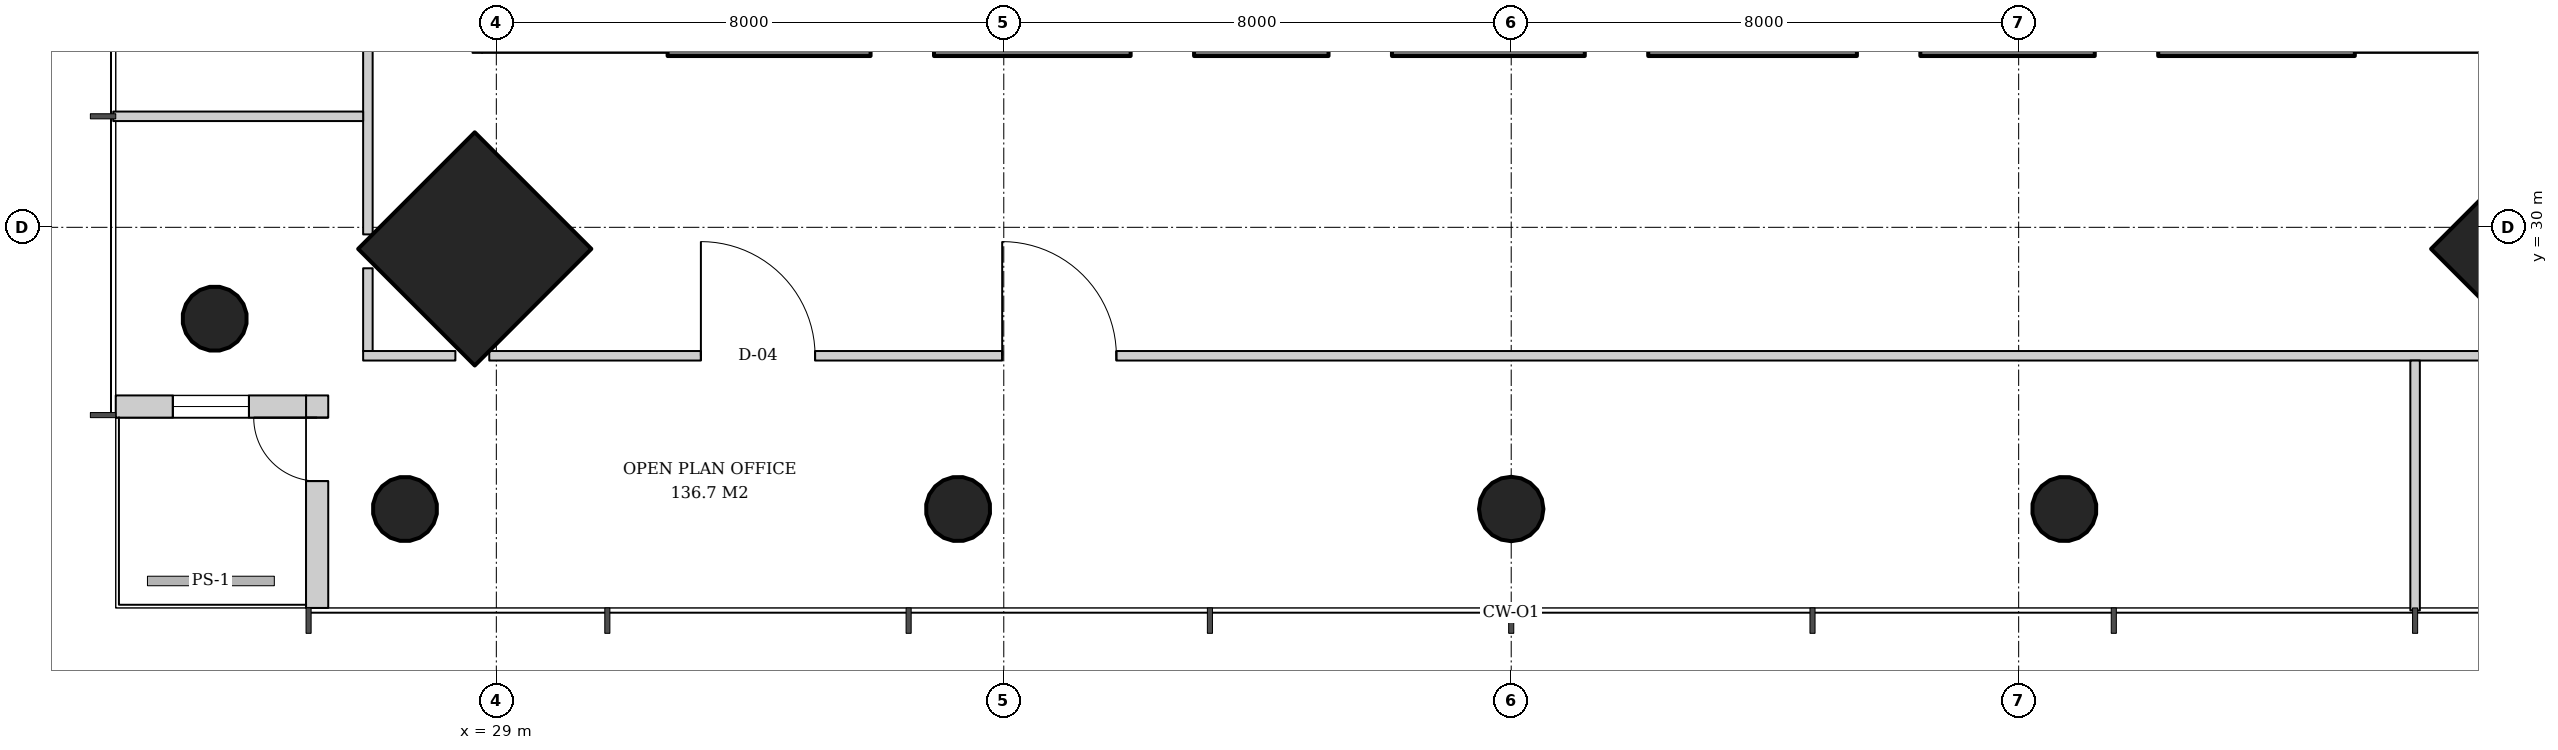
"""IFC4 building model, lengths in metres.
Left out: names, types, materials, properties, quantities, classifications, styles, units other than length and angle.
Written with IfcOpenShell. Run it as: python <this file> out.ifc"""

import sys

from ifc_helpers import new_model, si_unit, direction, frame, frame_2d, origin, origin_2d, place, context, subcontext, project, spatial, rectangle, hollow_circle, extrude, element, fill, save


model = new_model("IFC4")
c1 = context("Model", 3, precision=1e-05, world=origin(), true_north=direction((0.0, 1.0)))
c2 = subcontext(c1, "Body", "Model", "MODEL_VIEW")
j1 = project(units=[si_unit("LENGTHUNIT", "METRE"), si_unit("PLANEANGLEUNIT", "RADIAN")], contexts=[c1])
p1 = place(None, origin())
s1 = spatial("IfcSite", under=j1, at=p1, CompositionType="ELEMENT")
p2 = place(p1, origin())
s2 = spatial("IfcBuilding", under=s1, at=p2, CompositionType="ELEMENT")
p3 = place(p2, frame((0.0, 0.0, 131.2)))
s3 = spatial("IfcBuildingStorey", under=s2, at=p3, CompositionType="ELEMENT", Elevation=131.2)
p4 = place(p3, frame((28.621, 29.621, 0.0), z_axis=(0.031962158256, 0.031962158256, 0.998977898093), x_axis=(-0.707106781187, 0.707106781187, 0.0)))
e1 = element("IfcColumn", 1, at=p4, inside=s3, PredefinedType="COLUMN", context=c2, shape_type="SweptSolid", body=[
    extrude(rectangle(XDim=2.6, YDim=2.6, at=origin_2d()), origin(), (0.0, 0.0, 1.0), 3.804),
])
p5 = place(p3, frame((24.521, 28.521, 0.0), z_axis=(0.031898107953, 0.031898107953, 0.998981992539), x_axis=(-0.707106781187, 0.707106781187, 0.0)))
e2 = element("IfcColumn", 2, at=p5, inside=s3, PredefinedType="COLUMN", context=c2, shape_type="SweptSolid", body=[
    extrude(hollow_circle(Radius=0.508, WallThickness=0.04, at=origin_2d()), origin(), (0.0, 0.0, 1.0), 3.804),
])
p6 = place(p3, frame((61.379, 29.621, 0.0), z_axis=(-0.031962158256, 0.031962158256, 0.998977898093), x_axis=(-0.707106781187, -0.707106781187, 0.0)))
e3 = element("IfcColumn", 3, at=p6, inside=s3, PredefinedType="COLUMN", context=c2, shape_type="SweptSolid", body=[
    extrude(rectangle(XDim=2.6, YDim=2.6, at=origin_2d()), origin(), (0.0, 0.0, 1.0), 3.804),
])
p7 = place(p3, frame((27.521, 25.521, 0.0), z_axis=(0.031898107953, 0.031898107953, 0.998981992539), x_axis=(-0.707106781187, 0.707106781187, 0.0)))
e4 = element("IfcColumn", 4, at=p7, inside=s3, PredefinedType="COLUMN", context=c2, shape_type="SweptSolid", body=[
    extrude(hollow_circle(Radius=0.508, WallThickness=0.04, at=origin_2d()), origin(), (0.0, 0.0, 1.0), 3.804),
])
p8 = place(p3, frame((36.261, 25.521, 0.0), z_axis=(0.015987237665, 0.031910269556, 0.999362868496), x_axis=(-0.894067115991, 0.447933021895, 0.0)))
e5 = element("IfcColumn", 5, at=p8, inside=s3, PredefinedType="COLUMN", context=c2, shape_type="SweptSolid", body=[
    extrude(hollow_circle(Radius=0.508, WallThickness=0.04, at=origin_2d()), origin(), (0.0, 0.0, 1.0), 3.802),
])
p9 = place(p3, frame((45.0, 25.521, 0.0), z_axis=(0.0, 0.031914348339, 0.999490607445), x_axis=(-1.0, 0.0, 0.0)))
e6 = element("IfcColumn", 6, at=p9, inside=s3, PredefinedType="COLUMN", context=c2, shape_type="SweptSolid", body=[
    extrude(hollow_circle(Radius=0.508, WallThickness=0.04, at=origin_2d()), origin(), (0.0, 0.0, 1.0), 3.802),
])
p10 = place(p3, frame((53.739, 25.521, 0.0), z_axis=(-0.015987237665, 0.031910269556, 0.999362868496), x_axis=(-0.894067115991, -0.447933021895, 0.0)))
e7 = element("IfcColumn", 7, at=p10, inside=s3, PredefinedType="COLUMN", context=c2, shape_type="SweptSolid", body=[
    extrude(hollow_circle(Radius=0.508, WallThickness=0.04, at=origin_2d()), origin(), (0.0, 0.0, 1.0), 3.802),
])
p11 = place(p3, frame((31.7, 33.05, 0.0), z_axis=(0.0, 0.0, 1.0), x_axis=(1.0, 0.0, 0.0)))
e8 = element("IfcWall", 8, at=p11, inside=s3, PredefinedType="SHEAR", context=c2, shape_type="SweptSolid", body=[
    extrude(rectangle(XDim=26.6, YDim=0.7, at=frame_2d((13.3, 0.0))), origin(), (0.0, 0.0, 1.0), 3.8),
])
p12 = place(p11, frame((7.3, 0.0, 0.0)))
e9 = element("IfcOpeningElement", 9, at=p12, cuts=e8, PredefinedType="OPENING", context=c2, shape_type="SweptSolid", body=[
    extrude(rectangle(XDim=1.0, YDim=2.1, at=frame_2d((0.5, 1.05))), frame((0.0, 0.36, 0.0), z_axis=(0.0, -1.0, 0.0), x_axis=(1.0, 0.0, 0.0)), (0.0, 0.0, 1.0), 0.72),
])
p13 = place(p11, frame((18.75, 0.0, 0.0)))
e10 = element("IfcOpeningElement", 10, at=p13, cuts=e8, PredefinedType="OPENING", context=c2, shape_type="SweptSolid", body=[
    extrude(rectangle(XDim=1.0, YDim=2.1, at=frame_2d((0.5, 1.05))), frame((0.0, 0.36, 0.0), z_axis=(0.0, -1.0, 0.0), x_axis=(1.0, 0.0, 0.0)), (0.0, 0.0, 1.0), 0.72),
])
p14 = place(p11, frame((3.2, 0.0, 0.0)))
e11 = element("IfcOpeningElement", 11, at=p14, cuts=e8, PredefinedType="OPENING", context=c2, shape_type="SweptSolid", body=[
    extrude(rectangle(XDim=1.0, YDim=2.1, at=frame_2d((0.5, 1.05))), frame((0.0, 0.36, 0.0), z_axis=(0.0, -1.0, 0.0), x_axis=(1.0, 0.0, 0.0)), (0.0, 0.0, 1.0), 0.72),
])
p15 = place(p11, frame((10.42, 0.0, 0.0)))
e12 = element("IfcOpeningElement", 12, at=p15, cuts=e8, PredefinedType="OPENING", context=c2, shape_type="SweptSolid", body=[
    extrude(rectangle(XDim=1.0, YDim=2.1, at=frame_2d((0.5, 1.05))), frame((0.0, 0.36, 0.0), z_axis=(0.0, -1.0, 0.0), x_axis=(1.0, 0.0, 0.0)), (0.0, 0.0, 1.0), 0.72),
])
p16 = place(p11, frame((14.46, 0.0, 0.0)))
e13 = element("IfcOpeningElement", 13, at=p16, cuts=e8, PredefinedType="OPENING", context=c2, shape_type="SweptSolid", body=[
    extrude(rectangle(XDim=1.0, YDim=2.1, at=frame_2d((0.5, 1.05))), frame((0.0, 0.36, 0.0), z_axis=(0.0, -1.0, 0.0), x_axis=(1.0, 0.0, 0.0)), (0.0, 0.0, 1.0), 0.72),
])
p17 = place(p11, frame((22.5, 0.0, 0.0)))
e14 = element("IfcOpeningElement", 14, at=p17, cuts=e8, PredefinedType="OPENING", context=c2, shape_type="SweptSolid", body=[
    extrude(rectangle(XDim=1.0, YDim=2.1, at=frame_2d((0.5, 1.05))), frame((0.0, 0.36, 0.0), z_axis=(0.0, -1.0, 0.0), x_axis=(1.0, 0.0, 0.0)), (0.0, 0.0, 1.0), 0.72),
])
p18 = place(p3, frame((26.175, 24.0, 0.0), z_axis=(0.0, 0.0, 1.0), x_axis=(0.0, 1.0, 0.0)))
e15 = element("IfcWall", 15, at=p18, inside=s3, PredefinedType="SOLIDWALL", context=c2, shape_type="SweptSolid", body=[
    extrude(rectangle(XDim=3.35, YDim=0.35, at=frame_2d((1.675, 0.0))), origin(), (0.0, 0.0, 1.0), 3.62),
])
p19 = place(p18, frame((2.0, 0.0, 0.0)))
e16 = element("IfcOpeningElement", 16, at=p19, cuts=e15, PredefinedType="OPENING", context=c2, shape_type="SweptSolid", body=[
    extrude(rectangle(XDim=1.0, YDim=2.4, at=frame_2d((0.5, 1.2))), frame((0.0, 0.185, 0.0), z_axis=(0.0, -1.0, 0.0), x_axis=(1.0, 0.0, 0.0)), (0.0, 0.0, 1.0), 0.37),
])
p20 = place(p3, frame((26.0, 27.175, 0.0), z_axis=(0.0, 0.0, 1.0), x_axis=(-1.0, 0.0, 0.0)))
e17 = element("IfcWall", 17, at=p20, inside=s3, PredefinedType="SOLIDWALL", context=c2, shape_type="SweptSolid", body=[
    extrude(rectangle(XDim=3.0, YDim=0.35, at=frame_2d((1.5, 0.0))), origin(), (0.0, 0.0, 1.0), 3.62),
])
p21 = place(p20, frame((0.9, 0.0, 0.6)))
e18 = element("IfcOpeningElement", 18, at=p21, cuts=e17, PredefinedType="OPENING", context=c2, shape_type="SweptSolid", body=[
    extrude(rectangle(XDim=1.2, YDim=2.55, at=frame_2d((0.6, 1.275))), frame((0.0, 0.185, 0.0), z_axis=(0.0, -1.0, 0.0), x_axis=(1.0, 0.0, 0.0)), (0.0, 0.0, 1.0), 0.37),
])
p22 = place(p3, frame((26.975, 62.112, 0.0), z_axis=(0.0, 0.0, 1.0), x_axis=(0.0, -1.0, 0.0)))
e19 = element("IfcWall", 19, at=p22, inside=s3, PredefinedType="PARTITIONING", context=c2, shape_type="SweptSolid", body=[
    extrude(rectangle(XDim=32.223, YDim=0.15, at=frame_2d((16.112, 0.0))), origin(), (0.0, 0.0, 1.0), 2.72),
])
p23 = place(p22, frame((3.737, 0.0, 0.0)))
e20 = element("IfcOpeningElement", 20, at=p23, cuts=e19, PredefinedType="OPENING", context=c2, shape_type="SweptSolid", body=[
    extrude(rectangle(XDim=1.0, YDim=2.1, at=frame_2d((0.5, 1.05))), frame((0.0, 0.085, 0.0), z_axis=(0.0, -1.0, 0.0), x_axis=(1.0, 0.0, 0.0)), (0.0, 0.0, 1.0), 0.17),
])
p24 = place(p22, frame((8.487, 0.0, 0.0)))
e21 = element("IfcOpeningElement", 21, at=p24, cuts=e19, PredefinedType="OPENING", context=c2, shape_type="SweptSolid", body=[
    extrude(rectangle(XDim=1.0, YDim=2.1, at=frame_2d((0.5, 1.05))), frame((0.0, 0.085, 0.0), z_axis=(0.0, -1.0, 0.0), x_axis=(1.0, 0.0, 0.0)), (0.0, 0.0, 1.0), 0.17),
])
p25 = place(p22, frame((13.237, 0.0, 0.0)))
e22 = element("IfcOpeningElement", 22, at=p25, cuts=e19, PredefinedType="OPENING", context=c2, shape_type="SweptSolid", body=[
    extrude(rectangle(XDim=1.0, YDim=2.1, at=frame_2d((0.5, 1.05))), frame((0.0, 0.085, 0.0), z_axis=(0.0, -1.0, 0.0), x_axis=(1.0, 0.0, 0.0)), (0.0, 0.0, 1.0), 0.17),
])
p26 = place(p22, frame((18.086, 0.0, 0.0)))
e23 = element("IfcOpeningElement", 23, at=p26, cuts=e19, PredefinedType="OPENING", context=c2, shape_type="SweptSolid", body=[
    extrude(rectangle(XDim=0.8, YDim=2.1, at=frame_2d((0.4, 1.05))), frame((0.0, 0.085, 0.0), z_axis=(0.0, -1.0, 0.0), x_axis=(1.0, 0.0, 0.0)), (0.0, 0.0, 1.0), 0.17),
])
p27 = place(p22, frame((22.737, 0.0, 0.0)))
e24 = element("IfcOpeningElement", 24, at=p27, cuts=e19, PredefinedType="OPENING", context=c2, shape_type="SweptSolid", body=[
    extrude(rectangle(XDim=1.0, YDim=2.1, at=frame_2d((0.5, 1.05))), frame((0.0, 0.085, 0.0), z_axis=(0.0, -1.0, 0.0), x_axis=(1.0, 0.0, 0.0)), (0.0, 0.0, 1.0), 0.17),
])
p28 = place(p22, frame((27.586, 0.0, 0.0)))
e25 = element("IfcOpeningElement", 25, at=p28, cuts=e19, PredefinedType="OPENING", context=c2, shape_type="SweptSolid", body=[
    extrude(rectangle(XDim=0.8, YDim=2.1, at=frame_2d((0.4, 1.05))), frame((0.0, 0.085, 0.0), z_axis=(0.0, -1.0, 0.0), x_axis=(1.0, 0.0, 0.0)), (0.0, 0.0, 1.0), 0.17),
])
p29 = place(p3, frame((26.975, 29.354, 0.0), z_axis=(0.0, 0.0, 1.0), x_axis=(0.0, -1.0, 0.0)))
e26 = element("IfcWall", 26, at=p29, inside=s3, PredefinedType="PARTITIONING", context=c2, shape_type="SweptSolid", body=[
    extrude(rectangle(XDim=1.304, YDim=0.15, at=frame_2d((0.652, 0.0))), origin(), (0.0, 0.0, 1.0), 3.07),
])
p30 = place(p3, frame((26.9, 31.75, 0.0), z_axis=(0.0, 0.0, 1.0), x_axis=(-1.0, 0.0, 0.0)))
e27 = element("IfcWall", 27, at=p30, inside=s3, PredefinedType="PARTITIONING", context=c2, shape_type="SweptSolid", body=[
    extrude(rectangle(XDim=3.94, YDim=0.15, at=frame_2d((1.97, 0.0))), origin(), (0.0, 0.0, 1.0), 2.82),
])
p31 = place(p3, frame((26.9, 27.975, 0.0), z_axis=(0.0, 0.0, 1.0), x_axis=(1.0, 0.0, 0.0)))
e28 = element("IfcWall", 28, at=p31, inside=s3, PredefinedType="PARTITIONING", context=c2, shape_type="SweptSolid", body=[
    extrude(rectangle(XDim=1.455, YDim=0.15, at=frame_2d((0.727, 0.0))), origin(), (0.0, 0.0, 1.0), 3.07),
])
p32 = place(p3, frame((28.888, 27.975, 0.0), z_axis=(0.0, 0.0, 1.0), x_axis=(1.0, 0.0, 0.0)))
e29 = element("IfcWall", 29, at=p32, inside=s3, PredefinedType="PARTITIONING", context=c2, shape_type="SweptSolid", body=[
    extrude(rectangle(XDim=32.223, YDim=0.15, at=frame_2d((16.112, 0.0))), origin(), (0.0, 0.0, 1.0), 2.72),
])
p33 = place(p32, frame((3.336, 0.0, 0.0)))
e30 = element("IfcOpeningElement", 30, at=p33, cuts=e29, PredefinedType="OPENING", context=c2, shape_type="SweptSolid", body=[
    extrude(rectangle(XDim=1.8, YDim=2.4, at=frame_2d((0.9, 1.2))), frame((0.0, 0.085, 0.0), z_axis=(0.0, -1.0, 0.0), x_axis=(1.0, 0.0, 0.0)), (0.0, 0.0, 1.0), 0.17),
])
p34 = place(p32, frame((8.086, 0.0, 0.0)))
e31 = element("IfcOpeningElement", 31, at=p34, cuts=e29, PredefinedType="OPENING", context=c2, shape_type="SweptSolid", body=[
    extrude(rectangle(XDim=1.8, YDim=2.4, at=frame_2d((0.9, 1.2))), frame((0.0, 0.085, 0.0), z_axis=(0.0, -1.0, 0.0), x_axis=(1.0, 0.0, 0.0)), (0.0, 0.0, 1.0), 0.17),
])
p35 = place(p3, frame((59.25, 27.9, 0.0), z_axis=(0.0, 0.0, 1.0), x_axis=(0.0, -1.0, 0.0)))
e32 = element("IfcWall", 32, at=p35, inside=s3, PredefinedType="PARTITIONING", context=c2, shape_type="SweptSolid", body=[
    extrude(rectangle(XDim=3.94, YDim=0.15, at=frame_2d((1.97, 0.0))), origin(), (0.0, 0.0, 1.0), 2.82),
])
p36 = place(p19, origin())
e33 = element("IfcDoor", 33, at=p36, inside=s3, OperationType="SINGLE_SWING_RIGHT", PredefinedType="DOOR", context=c2, shape_type="SweptSolid", body=[
    extrude(rectangle(XDim=1.0, YDim=2.4, at=frame_2d((0.5, 1.2))), frame((0.0, 0.025, 0.0), z_axis=(0.0, -1.0, 0.0), x_axis=(1.0, 0.0, 0.0)), (0.0, 0.0, 1.0), 0.05),
])
fill(e16, e33)
p37 = place(p21, origin())
e34 = element("IfcWindow", 34, at=p37, inside=s3, PartitioningType="SINGLE_PANEL", PredefinedType="WINDOW", context=c2, shape_type="SweptSolid", body=[
    extrude(rectangle(XDim=1.2, YDim=2.55, at=frame_2d((0.6, 1.275))), frame((0.0, 0.03, 0.0), z_axis=(0.0, -1.0, 0.0), x_axis=(1.0, 0.0, 0.0)), (0.0, 0.0, 1.0), 0.06),
])
fill(e18, e34)
p38 = place(p33, origin())
e35 = element("IfcDoor", 35, at=p38, inside=s3, OperationType="DOUBLE_DOOR_SINGLE_SWING", PredefinedType="DOOR", context=c2, shape_type="SweptSolid", body=[
    extrude(rectangle(XDim=1.8, YDim=2.4, at=frame_2d((0.9, 1.2))), frame((0.0, 0.025, 0.0), z_axis=(0.0, -1.0, 0.0), x_axis=(1.0, 0.0, 0.0)), (0.0, 0.0, 1.0), 0.05),
])
fill(e30, e35)
p39 = place(p34, origin())
e36 = element("IfcDoor", 36, at=p39, inside=s3, OperationType="DOUBLE_DOOR_SINGLE_SWING", PredefinedType="DOOR", context=c2, shape_type="SweptSolid", body=[
    extrude(rectangle(XDim=1.8, YDim=2.4, at=frame_2d((0.9, 1.2))), frame((0.0, 0.025, 0.0), z_axis=(0.0, -1.0, 0.0), x_axis=(1.0, 0.0, 0.0)), (0.0, 0.0, 1.0), 0.05),
])
fill(e31, e36)
save(model, sys.argv[1])
